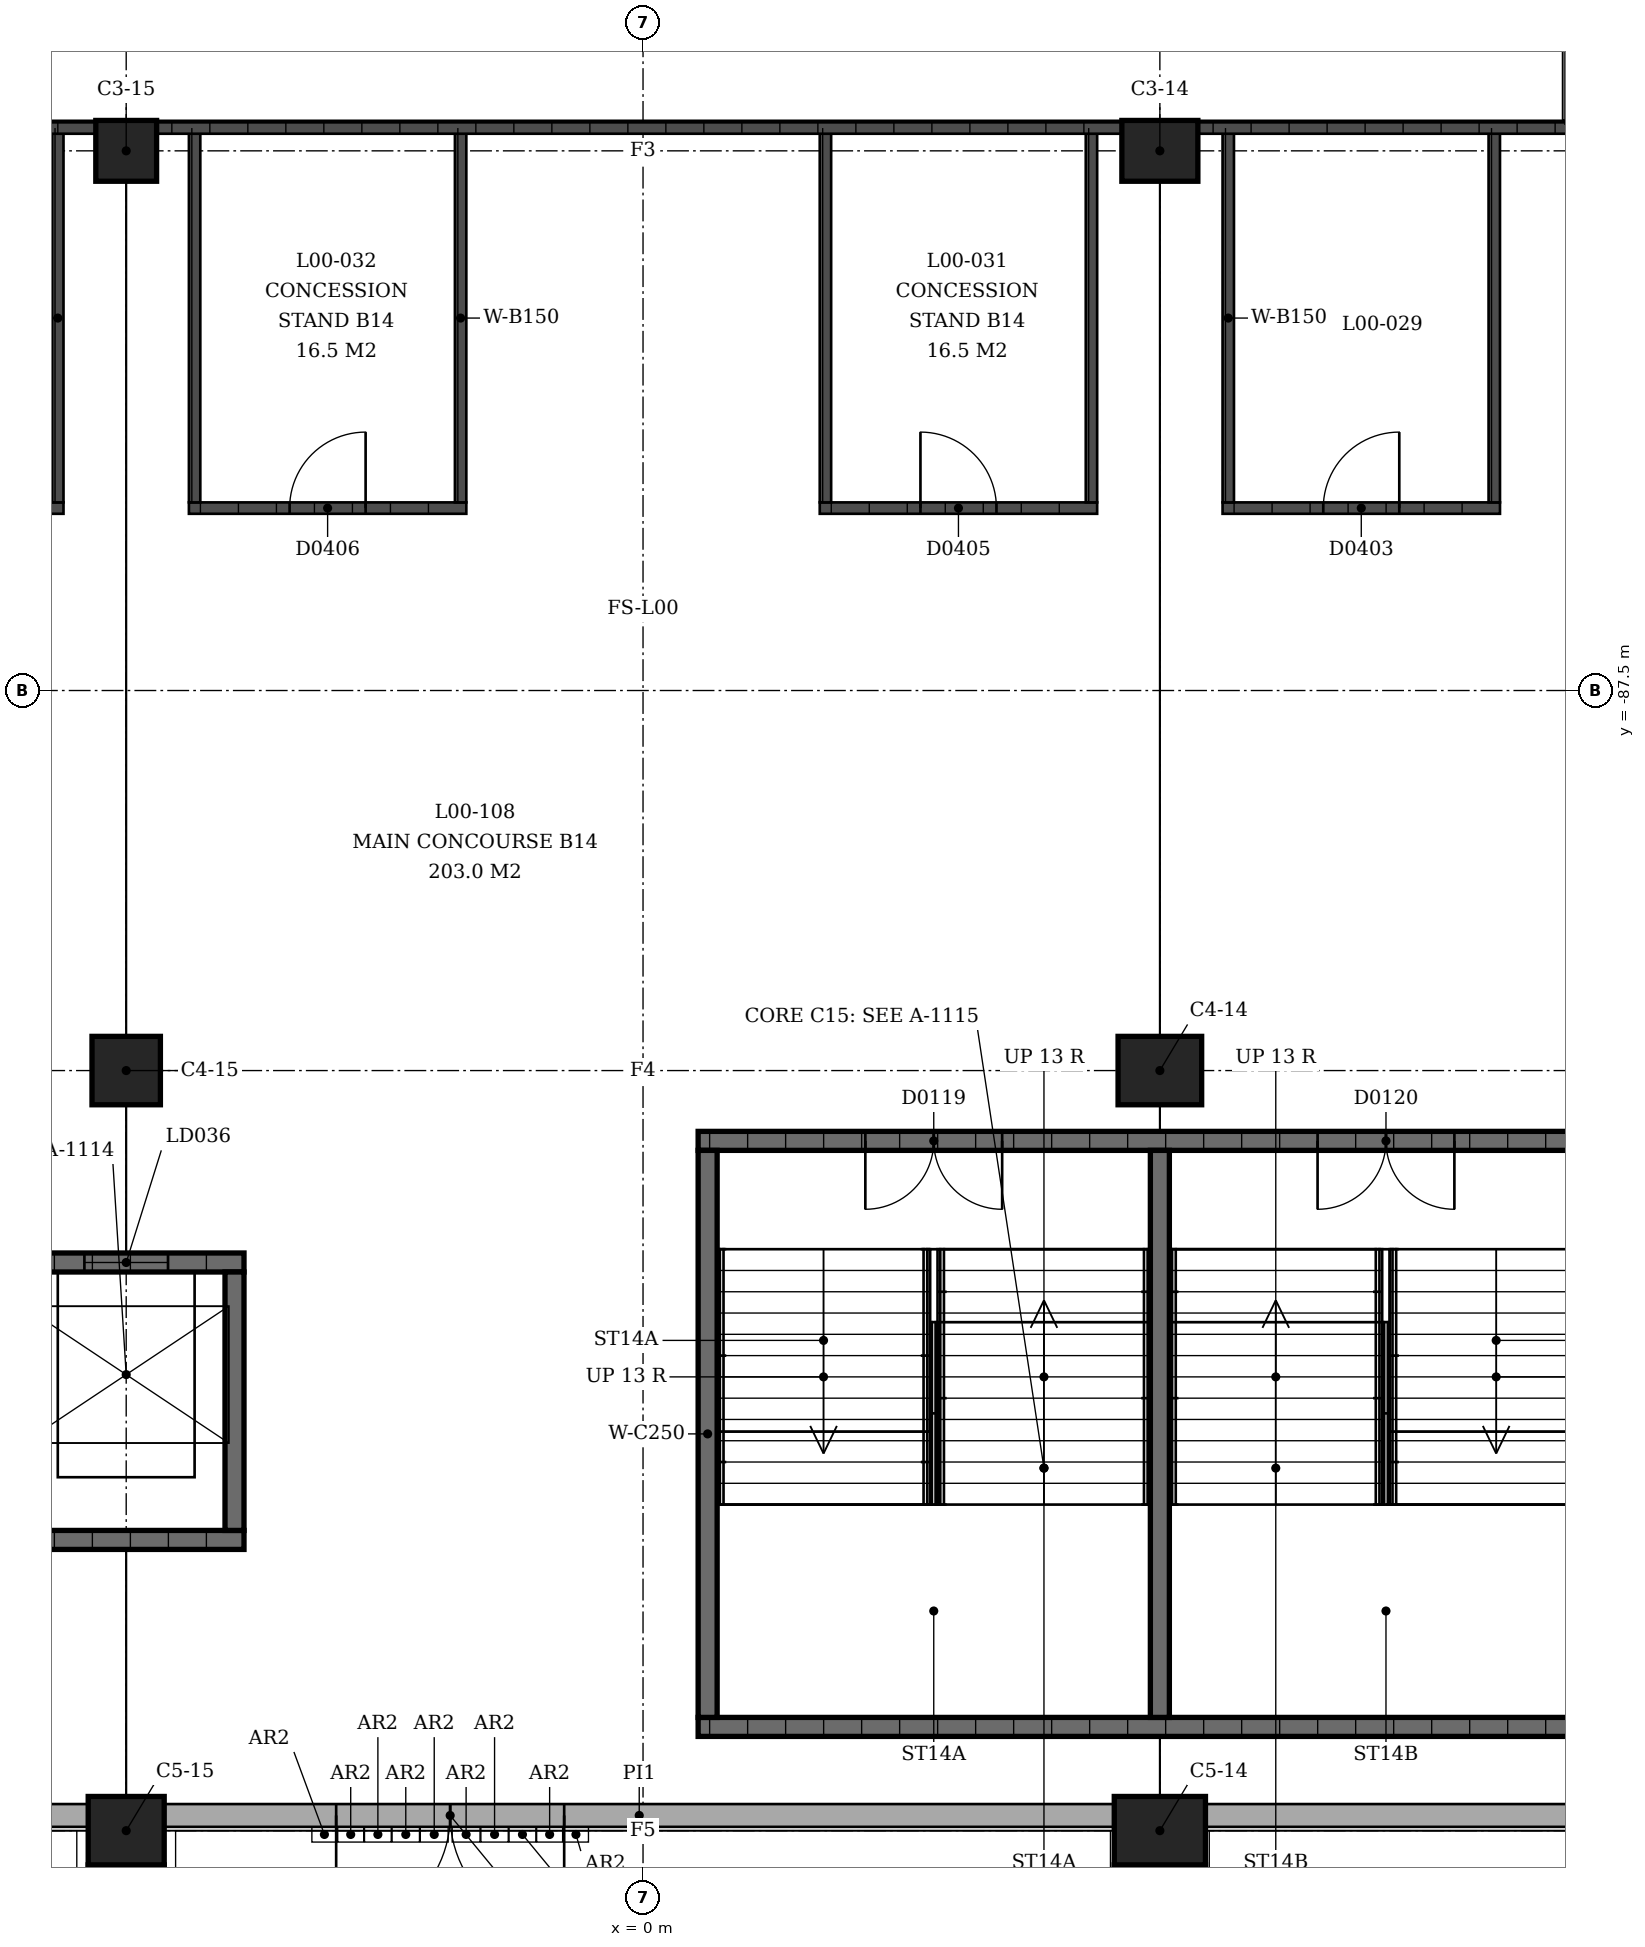
"""IFC4 building model, lengths in metres.
Left out: names, types, materials, properties, quantities, classifications, styles, units other than length and angle.
Written with IfcOpenShell. Run it as: python <this file> out.ifc"""

import sys

from ifc_helpers import new_model, si_unit, direction, frame, frame_2d, origin, origin_2d, place, context, subcontext, project, spatial, rectangle, extrude, element, fill, save


model = new_model("IFC4")
c1 = context("Model", 3, precision=1e-05, world=origin(), true_north=direction((0.0, 1.0)))
c2 = subcontext(c1, "Body", "Model", "MODEL_VIEW")
j1 = project(units=[si_unit("LENGTHUNIT", "METRE"), si_unit("PLANEANGLEUNIT", "RADIAN")], contexts=[c1])
p1 = place(None, origin())
s1 = spatial("IfcSite", under=j1, at=p1, CompositionType="ELEMENT")
p2 = place(p1, origin())
s2 = spatial("IfcBuilding", under=s1, at=p2, CompositionType="ELEMENT")
p3 = place(p2, origin())
s3 = spatial("IfcBuildingStorey", under=s2, at=p3, CompositionType="ELEMENT", Elevation=0.0)
p4 = place(p3, frame((6.8, -80.4, 0.0), z_axis=(0.0, 0.0, 1.0), x_axis=(1.0, 0.0, 0.0)))
e1 = element("IfcColumn", 1, at=p4, inside=s3, PredefinedType="COLUMN", context=c2, shape_type="SweptSolid", body=[
    extrude(rectangle(XDim=1.0, YDim=0.8, at=origin_2d()), origin(), (0.0, 0.0, 1.0), 4.5),
])
p5 = place(p3, frame((6.8, -92.5, 0.0), z_axis=(0.0, 0.0, 1.0), x_axis=(1.0, 0.0, 0.0)))
e2 = element("IfcColumn", 2, at=p5, inside=s3, PredefinedType="COLUMN", context=c2, shape_type="SweptSolid", body=[
    extrude(rectangle(XDim=1.1, YDim=0.9, at=origin_2d()), origin(), (0.0, 0.0, 1.0), 4.5),
])
p6 = place(p3, frame((6.8, -102.5, 0.0), z_axis=(0.0, 0.0, 1.0), x_axis=(1.0, 0.0, 0.0)))
e3 = element("IfcColumn", 3, at=p6, inside=s3, PredefinedType="COLUMN", context=c2, shape_type="SweptSolid", body=[
    extrude(rectangle(XDim=1.2, YDim=0.9, at=origin_2d()), origin(), (0.0, 0.0, 1.0), 4.5),
])
p7 = place(p3, frame((-6.8, -80.4, 0.0), z_axis=(0.0, 0.0, 1.0), x_axis=(1.0, 0.0, 0.0)))
e4 = element("IfcColumn", 4, at=p7, inside=s3, PredefinedType="COLUMN", context=c2, shape_type="SweptSolid", body=[
    extrude(rectangle(XDim=0.8, YDim=0.8, at=origin_2d()), origin(), (0.0, 0.0, 1.0), 4.5),
])
p8 = place(p3, frame((-6.8, -92.5, 0.0), z_axis=(0.0, 0.0, 1.0), x_axis=(1.0, 0.0, 0.0)))
e5 = element("IfcColumn", 5, at=p8, inside=s3, PredefinedType="COLUMN", context=c2, shape_type="SweptSolid", body=[
    extrude(rectangle(XDim=0.9, YDim=0.9, at=origin_2d()), origin(), (0.0, 0.0, 1.0), 4.5),
])
p9 = place(p3, frame((-6.8, -102.5, 0.0), z_axis=(0.0, 0.0, 1.0), x_axis=(1.0, 0.0, 0.0)))
e6 = element("IfcColumn", 6, at=p9, inside=s3, PredefinedType="COLUMN", context=c2, shape_type="SweptSolid", body=[
    extrude(rectangle(XDim=1.0, YDim=0.9, at=origin_2d()), origin(), (0.0, 0.0, 1.0), 4.5),
])
p10 = place(p3, frame((19.9, -102.3, 0.0), z_axis=(0.0, 0.0, 1.0), x_axis=(-1.0, 0.0, 0.0)))
e7 = element("IfcWall", 7, at=p10, inside=s3, PredefinedType="SOLIDWALL", context=c2, shape_type="SweptSolid", body=[
    extrude(rectangle(XDim=12.5, YDim=0.3, at=frame_2d((6.25, 0.0))), origin(), (0.0, 0.0, 1.0), 3.09),
])
p11 = place(p10, frame((1.363, 0.0, 0.0)))
e8 = element("IfcOpeningElement", 8, at=p11, cuts=e7, PredefinedType="OPENING", context=c2, shape_type="SweptSolid", body=[
    extrude(rectangle(XDim=4.8, YDim=2.4, at=frame_2d((2.4, 1.2))), frame((0.0, 0.16, 0.0), z_axis=(0.0, -1.0, 0.0), x_axis=(1.0, 0.0, 0.0)), (0.0, 0.0, 1.0), 0.32),
])
p12 = place(p3, frame((6.2, -102.3, 0.0), z_axis=(0.0, 0.0, 1.0), x_axis=(-1.0, 0.0, 0.0)))
e9 = element("IfcWall", 9, at=p12, inside=s3, PredefinedType="SOLIDWALL", context=c2, shape_type="SweptSolid", body=[
    extrude(rectangle(XDim=12.5, YDim=0.3, at=frame_2d((6.25, 0.0))), origin(), (0.0, 0.0, 1.0), 3.09),
])
p13 = place(p12, frame((7.238, 0.0, 0.0)))
e10 = element("IfcOpeningElement", 10, at=p13, cuts=e9, PredefinedType="OPENING", context=c2, shape_type="SweptSolid", body=[
    extrude(rectangle(XDim=3.0, YDim=2.4, at=frame_2d((1.5, 1.2))), frame((0.0, 0.16, 0.0), z_axis=(0.0, -1.0, 0.0), x_axis=(1.0, 0.0, 0.0)), (0.0, 0.0, 1.0), 0.32),
])
p14 = place(p3, frame((-7.3, -102.3, 0.0), z_axis=(0.0, 0.0, 1.0), x_axis=(-1.0, 0.0, 0.0)))
e11 = element("IfcWall", 11, at=p14, inside=s3, PredefinedType="SOLIDWALL", context=c2, shape_type="SweptSolid", body=[
    extrude(rectangle(XDim=12.5, YDim=0.3, at=frame_2d((6.25, 0.0))), origin(), (0.0, 0.0, 1.0), 3.09),
])
p15 = place(p14, frame((1.363, 0.0, 0.0)))
e12 = element("IfcOpeningElement", 12, at=p15, cuts=e11, PredefinedType="OPENING", context=c2, shape_type="SweptSolid", body=[
    extrude(rectangle(XDim=4.8, YDim=2.4, at=frame_2d((2.4, 1.2))), frame((0.0, 0.16, 0.0), z_axis=(0.0, -1.0, 0.0), x_axis=(1.0, 0.0, 0.0)), (0.0, 0.0, 1.0), 0.32),
])
p16 = place(p3, frame((0.725, -93.425, 0.0), z_axis=(0.0, 0.0, 1.0), x_axis=(1.0, 0.0, 0.0)))
e13 = element("IfcWall", 13, at=p16, inside=s3, PredefinedType="SHEAR", context=c2, shape_type="SweptSolid", body=[
    extrude(rectangle(XDim=12.15, YDim=0.25, at=frame_2d((6.075, 0.0))), origin(), (0.0, 0.0, 1.0), 4.09),
])
p17 = place(p16, frame((2.2, 0.0, 0.0)))
e14 = element("IfcOpeningElement", 14, at=p17, cuts=e13, PredefinedType="OPENING", context=c2, shape_type="SweptSolid", body=[
    extrude(rectangle(XDim=1.8, YDim=2.1, at=frame_2d((0.9, 1.05))), frame((0.0, 0.125, 0.0), z_axis=(0.0, -1.0, 0.0), x_axis=(1.0, 0.0, 0.0)), (0.0, 0.0, 1.0), 0.25),
])
p18 = place(p16, frame((8.15, 0.0, 0.0)))
e15 = element("IfcOpeningElement", 15, at=p18, cuts=e13, PredefinedType="OPENING", context=c2, shape_type="SweptSolid", body=[
    extrude(rectangle(XDim=1.8, YDim=2.1, at=frame_2d((0.9, 1.05))), frame((0.0, 0.125, 0.0), z_axis=(0.0, -1.0, 0.0), x_axis=(1.0, 0.0, 0.0)), (0.0, 0.0, 1.0), 0.25),
])
p19 = place(p3, frame((0.725, -101.135, 0.0), z_axis=(0.0, 0.0, 1.0), x_axis=(1.0, 0.0, 0.0)))
e16 = element("IfcWall", 16, at=p19, inside=s3, PredefinedType="SHEAR", context=c2, shape_type="SweptSolid", body=[
    extrude(rectangle(XDim=12.15, YDim=0.25, at=frame_2d((6.075, 0.0))), origin(), (0.0, 0.0, 1.0), 4.09),
])
for number, where, z_axis, x_axis in (
    (17, (0.85, -93.55, 0.0), (0.0, 0.0, 1.0), (0.0, -1.0, 0.0)),
    (18, (6.8, -93.55, 0.0), (0.0, 0.0, 1.0), (0.0, -1.0, 0.0)),
):
    element("IfcWall", number, at=place(p3, frame(where, z_axis=z_axis, x_axis=x_axis)), inside=s3, PredefinedType="SHEAR", context=c2, shape_type="SweptSolid", body=[
        extrude(rectangle(XDim=7.46, YDim=0.25, at=frame_2d((3.73, 0.0))), origin(), (0.0, 0.0, 1.0), 4.09),
    ])
p20 = place(p3, frame((-8.35, -95.025, 0.0), z_axis=(0.0, 0.0, 1.0), x_axis=(1.0, 0.0, 0.0)))
e19 = element("IfcWall", 19, at=p20, inside=s3, PredefinedType="SHEAR", context=c2, shape_type="SweptSolid", body=[
    extrude(rectangle(XDim=3.1, YDim=0.25, at=frame_2d((1.55, 0.0))), origin(), (0.0, 0.0, 1.0), 4.09),
])
p21 = place(p20, frame((1.0, 0.0, 0.0)))
e20 = element("IfcOpeningElement", 20, at=p21, cuts=e19, PredefinedType="OPENING", context=c2, shape_type="SweptSolid", body=[
    extrude(rectangle(XDim=1.1, YDim=2.1, at=frame_2d((0.55, 1.05))), frame((0.0, 0.125, 0.0), z_axis=(0.0, -1.0, 0.0), x_axis=(1.0, 0.0, 0.0)), (0.0, 0.0, 1.0), 0.25),
])
p22 = place(p3, frame((-8.35, -98.675, 0.0), z_axis=(0.0, 0.0, 1.0), x_axis=(1.0, 0.0, 0.0)))
e21 = element("IfcWall", 21, at=p22, inside=s3, PredefinedType="SHEAR", context=c2, shape_type="SweptSolid", body=[
    extrude(rectangle(XDim=3.1, YDim=0.25, at=frame_2d((1.55, 0.0))), origin(), (0.0, 0.0, 1.0), 4.09),
])
p23 = place(p3, frame((-5.375, -95.15, 0.0), z_axis=(0.0, 0.0, 1.0), x_axis=(0.0, -1.0, 0.0)))
e22 = element("IfcWall", 22, at=p23, inside=s3, PredefinedType="SHEAR", context=c2, shape_type="SweptSolid", body=[
    extrude(rectangle(XDim=3.4, YDim=0.25, at=frame_2d((1.7, 0.0))), origin(), (0.0, 0.0, 1.0), 4.09),
])
p24 = place(p3, frame((7.625, -85.1, 0.0), z_axis=(0.0, 0.0, 1.0), x_axis=(1.0, 0.0, 0.0)))
e23 = element("IfcWall", 23, at=p24, inside=s3, PredefinedType="SOLIDWALL", context=c2, shape_type="SweptSolid", body=[
    extrude(rectangle(XDim=3.65, YDim=0.15, at=frame_2d((1.825, 0.0))), origin(), (0.0, 0.0, 1.0), 3.0),
])
p25 = place(p24, frame((1.325, 0.0, 0.0)))
e24 = element("IfcOpeningElement", 24, at=p25, cuts=e23, PredefinedType="OPENING", context=c2, shape_type="SweptSolid", body=[
    extrude(rectangle(XDim=1.0, YDim=2.1, at=frame_2d((0.5, 1.05))), frame((0.0, 0.075, 0.0), z_axis=(0.0, -1.0, 0.0), x_axis=(1.0, 0.0, 0.0)), (0.0, 0.0, 1.0), 0.15),
])
for number, where, z_axis, x_axis in (
    (25, (7.7, -80.1, 0.0), (0.0, 0.0, 1.0), (0.0, -1.0, 0.0)),
    (26, (11.2, -80.1, 0.0), (0.0, 0.0, 1.0), (0.0, -1.0, 0.0)),
):
    element("IfcWall", number, at=place(p3, frame(where, z_axis=z_axis, x_axis=x_axis)), inside=s3, PredefinedType="SOLIDWALL", context=c2, shape_type="SweptSolid", body=[
        extrude(rectangle(XDim=4.925, YDim=0.15, at=frame_2d((2.462, 0.0))), origin(), (0.0, 0.0, 1.0), 3.0),
    ])
p26 = place(p3, frame((5.975, -85.1, 0.0), z_axis=(0.0, 0.0, 1.0), x_axis=(-1.0, 0.0, 0.0)))
e27 = element("IfcWall", 27, at=p26, inside=s3, PredefinedType="SOLIDWALL", context=c2, shape_type="SweptSolid", body=[
    extrude(rectangle(XDim=3.65, YDim=0.15, at=frame_2d((1.825, 0.0))), origin(), (0.0, 0.0, 1.0), 3.0),
])
p27 = place(p26, frame((1.325, 0.0, 0.0)))
e28 = element("IfcOpeningElement", 28, at=p27, cuts=e27, PredefinedType="OPENING", context=c2, shape_type="SweptSolid", body=[
    extrude(rectangle(XDim=1.0, YDim=2.1, at=frame_2d((0.5, 1.05))), frame((0.0, 0.075, 0.0), z_axis=(0.0, -1.0, 0.0), x_axis=(1.0, 0.0, 0.0)), (0.0, 0.0, 1.0), 0.15),
])
for number, where, z_axis, x_axis in (
    (29, (5.9, -80.1, 0.0), (0.0, 0.0, 1.0), (0.0, -1.0, 0.0)),
    (30, (2.4, -80.1, 0.0), (0.0, 0.0, 1.0), (0.0, -1.0, 0.0)),
):
    element("IfcWall", number, at=place(p3, frame(where, z_axis=z_axis, x_axis=x_axis)), inside=s3, PredefinedType="SOLIDWALL", context=c2, shape_type="SweptSolid", body=[
        extrude(rectangle(XDim=4.925, YDim=0.15, at=frame_2d((2.462, 0.0))), origin(), (0.0, 0.0, 1.0), 3.0),
    ])
p28 = place(p3, frame((-2.325, -85.1, 0.0), z_axis=(0.0, 0.0, 1.0), x_axis=(-1.0, 0.0, 0.0)))
e31 = element("IfcWall", 31, at=p28, inside=s3, PredefinedType="SOLIDWALL", context=c2, shape_type="SweptSolid", body=[
    extrude(rectangle(XDim=3.65, YDim=0.15, at=frame_2d((1.825, 0.0))), origin(), (0.0, 0.0, 1.0), 3.0),
])
p29 = place(p28, frame((1.325, 0.0, 0.0)))
e32 = element("IfcOpeningElement", 32, at=p29, cuts=e31, PredefinedType="OPENING", context=c2, shape_type="SweptSolid", body=[
    extrude(rectangle(XDim=1.0, YDim=2.1, at=frame_2d((0.5, 1.05))), frame((0.0, 0.075, 0.0), z_axis=(0.0, -1.0, 0.0), x_axis=(1.0, 0.0, 0.0)), (0.0, 0.0, 1.0), 0.15),
])
for number, where, z_axis, x_axis in (
    (33, (-2.4, -80.1, 0.0), (0.0, 0.0, 1.0), (0.0, -1.0, 0.0)),
    (34, (-5.9, -80.1, 0.0), (0.0, 0.0, 1.0), (0.0, -1.0, 0.0)),
):
    element("IfcWall", number, at=place(p3, frame(where, z_axis=z_axis, x_axis=x_axis)), inside=s3, PredefinedType="SOLIDWALL", context=c2, shape_type="SweptSolid", body=[
        extrude(rectangle(XDim=4.925, YDim=0.15, at=frame_2d((2.462, 0.0))), origin(), (0.0, 0.0, 1.0), 3.0),
    ])
p30 = place(p3, frame((-11.275, -85.1, 0.0), z_axis=(0.0, 0.0, 1.0), x_axis=(1.0, 0.0, 0.0)))
e35 = element("IfcWall", 35, at=p30, inside=s3, PredefinedType="SOLIDWALL", context=c2, shape_type="SweptSolid", body=[
    extrude(rectangle(XDim=3.65, YDim=0.15, at=frame_2d((1.825, 0.0))), origin(), (0.0, 0.0, 1.0), 3.0),
])
p31 = place(p30, frame((1.325, 0.0, 0.0)))
e36 = element("IfcOpeningElement", 36, at=p31, cuts=e35, PredefinedType="OPENING", context=c2, shape_type="SweptSolid", body=[
    extrude(rectangle(XDim=1.0, YDim=2.1, at=frame_2d((0.5, 1.05))), frame((0.0, 0.075, 0.0), z_axis=(0.0, -1.0, 0.0), x_axis=(1.0, 0.0, 0.0)), (0.0, 0.0, 1.0), 0.15),
])
p32 = place(p3, frame((-7.7, -80.1, 0.0), z_axis=(0.0, 0.0, 1.0), x_axis=(0.0, -1.0, 0.0)))
e37 = element("IfcWall", 37, at=p32, inside=s3, PredefinedType="SOLIDWALL", context=c2, shape_type="SweptSolid", body=[
    extrude(rectangle(XDim=4.925, YDim=0.15, at=frame_2d((2.462, 0.0))), origin(), (0.0, 0.0, 1.0), 3.0),
])
p33 = place(p3, frame((20.0, -80.1, 0.0), z_axis=(0.0, 0.0, 1.0), x_axis=(-1.0, 0.0, 0.0)))
e38 = element("IfcWall", 38, at=p33, inside=s3, PredefinedType="SOLIDWALL", context=c2, shape_type="SweptSolid", body=[
    extrude(rectangle(XDim=12.7, YDim=0.15, at=frame_2d((6.35, 0.0))), origin(), (0.0, 0.0, 1.0), 3.0),
])
p34 = place(p33, frame((5.2, 0.0, 0.0)))
e39 = element("IfcOpeningElement", 39, at=p34, cuts=e38, PredefinedType="OPENING", context=c2, shape_type="SweptSolid", body=[
    extrude(rectangle(XDim=2.4, YDim=2.4, at=frame_2d((1.2, 1.2))), frame((0.0, 0.075, 0.0), z_axis=(0.0, -1.0, 0.0), x_axis=(1.0, 0.0, 0.0)), (0.0, 0.0, 1.0), 0.15),
])
p35 = place(p3, frame((6.3, -80.1, 0.0), z_axis=(0.0, 0.0, 1.0), x_axis=(-1.0, 0.0, 0.0)))
e40 = element("IfcWall", 40, at=p35, inside=s3, PredefinedType="SOLIDWALL", context=c2, shape_type="SweptSolid", body=[
    extrude(rectangle(XDim=12.7, YDim=0.15, at=frame_2d((6.35, 0.0))), origin(), (0.0, 0.0, 1.0), 3.0),
])
p36 = place(p3, frame((-7.2, -80.1, 0.0), z_axis=(0.0, 0.0, 1.0), x_axis=(-1.0, 0.0, 0.0)))
e41 = element("IfcWall", 41, at=p36, inside=s3, PredefinedType="SOLIDWALL", context=c2, shape_type="SweptSolid", body=[
    extrude(rectangle(XDim=12.7, YDim=0.15, at=frame_2d((6.35, 0.0))), origin(), (0.0, 0.0, 1.0), 3.0),
])
p37 = place(p36, frame((5.2, 0.0, 0.0)))
e42 = element("IfcOpeningElement", 42, at=p37, cuts=e41, PredefinedType="OPENING", context=c2, shape_type="SweptSolid", body=[
    extrude(rectangle(XDim=2.4, YDim=2.4, at=frame_2d((1.2, 1.2))), frame((0.0, 0.075, 0.0), z_axis=(0.0, -1.0, 0.0), x_axis=(1.0, 0.0, 0.0)), (0.0, 0.0, 1.0), 0.15),
])
p38 = place(p13, origin())
e43 = element("IfcDoor", 43, at=p38, inside=s3, OperationType="DOUBLE_DOOR_SINGLE_SWING", PredefinedType="DOOR", context=c2, shape_type="SweptSolid", body=[
    extrude(rectangle(XDim=3.0, YDim=2.4, at=frame_2d((1.5, 1.2))), frame((0.0, 0.025, 0.0), z_axis=(0.0, -1.0, 0.0), x_axis=(1.0, 0.0, 0.0)), (0.0, 0.0, 1.0), 0.05),
])
fill(e10, e43)
p39 = place(p17, origin())
e44 = element("IfcDoor", 44, at=p39, inside=s3, OperationType="DOUBLE_DOOR_SINGLE_SWING", PredefinedType="DOOR", context=c2, shape_type="SweptSolid", body=[
    extrude(rectangle(XDim=1.8, YDim=2.1, at=frame_2d((0.9, 1.05))), frame((0.0, 0.025, 0.0), z_axis=(0.0, -1.0, 0.0), x_axis=(1.0, 0.0, 0.0)), (0.0, 0.0, 1.0), 0.05),
])
fill(e14, e44)
p40 = place(p18, origin())
e45 = element("IfcDoor", 45, at=p40, inside=s3, OperationType="DOUBLE_DOOR_SINGLE_SWING", PredefinedType="DOOR", context=c2, shape_type="SweptSolid", body=[
    extrude(rectangle(XDim=1.8, YDim=2.1, at=frame_2d((0.9, 1.05))), frame((0.0, 0.025, 0.0), z_axis=(0.0, -1.0, 0.0), x_axis=(1.0, 0.0, 0.0)), (0.0, 0.0, 1.0), 0.05),
])
fill(e15, e45)
p41 = place(p21, origin())
e46 = element("IfcDoor", 46, at=p41, inside=s3, OperationType="SLIDING_TO_LEFT", PredefinedType="DOOR", context=c2, shape_type="SweptSolid", body=[
    extrude(rectangle(XDim=1.1, YDim=2.1, at=frame_2d((0.55, 1.05))), frame((0.0, 0.025, 0.0), z_axis=(0.0, -1.0, 0.0), x_axis=(1.0, 0.0, 0.0)), (0.0, 0.0, 1.0), 0.05),
])
fill(e20, e46)
p42 = place(p25, origin())
e47 = element("IfcDoor", 47, at=p42, inside=s3, OperationType="SINGLE_SWING_LEFT", PredefinedType="DOOR", context=c2, shape_type="SweptSolid", body=[
    extrude(rectangle(XDim=1.0, YDim=2.1, at=frame_2d((0.5, 1.05))), frame((0.0, 0.025, 0.0), z_axis=(0.0, -1.0, 0.0), x_axis=(1.0, 0.0, 0.0)), (0.0, 0.0, 1.0), 0.05),
])
fill(e24, e47)
p43 = place(p27, origin())
e48 = element("IfcDoor", 48, at=p43, inside=s3, OperationType="SINGLE_SWING_RIGHT", PredefinedType="DOOR", context=c2, shape_type="SweptSolid", body=[
    extrude(rectangle(XDim=1.0, YDim=2.1, at=frame_2d((0.5, 1.05))), frame((0.0, 0.025, 0.0), z_axis=(0.0, -1.0, 0.0), x_axis=(1.0, 0.0, 0.0)), (0.0, 0.0, 1.0), 0.05),
])
fill(e28, e48)
p44 = place(p29, origin())
e49 = element("IfcDoor", 49, at=p44, inside=s3, OperationType="SINGLE_SWING_LEFT", PredefinedType="DOOR", context=c2, shape_type="SweptSolid", body=[
    extrude(rectangle(XDim=1.0, YDim=2.1, at=frame_2d((0.5, 1.05))), frame((0.0, 0.025, 0.0), z_axis=(0.0, -1.0, 0.0), x_axis=(1.0, 0.0, 0.0)), (0.0, 0.0, 1.0), 0.05),
])
fill(e32, e49)
save(model, sys.argv[1])
